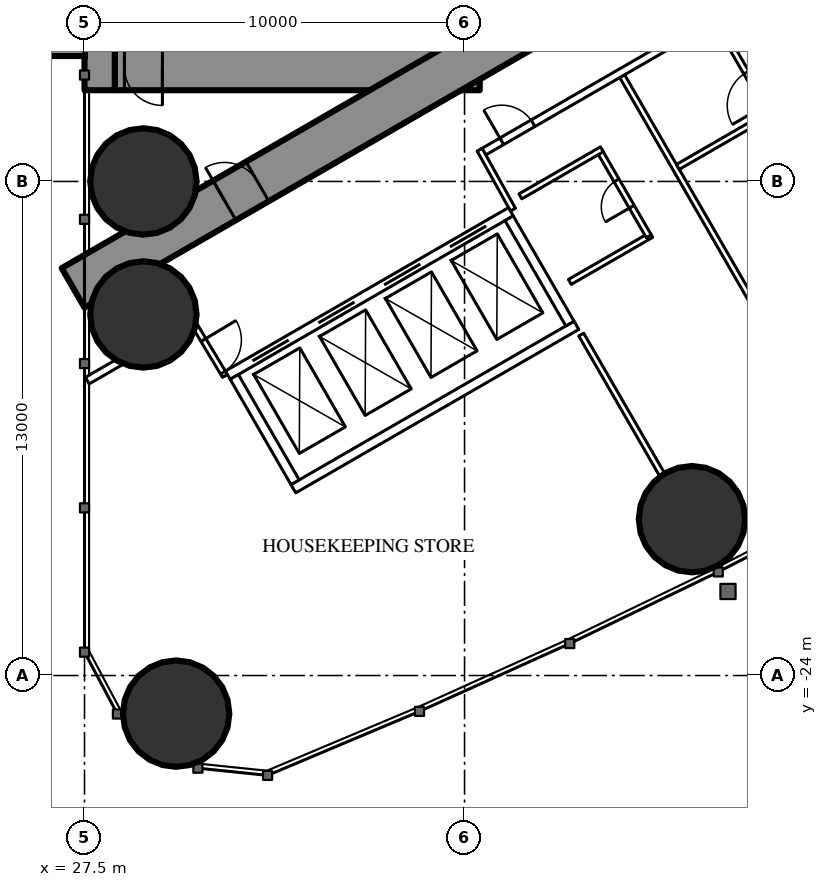
"""IFC4 building model, lengths in metres.
Left out: names, types, materials, properties, quantities, classifications, styles, units other than length and angle.
Written with IfcOpenShell. Run it as: python <this file> out.ifc"""

import sys

from ifc_helpers import new_model, si_unit, direction, frame, frame_2d, origin, origin_2d, place, context, subcontext, project, spatial, rectangle, hollow_circle, extrude, element, fill, save


model = new_model("IFC4")
c1 = context("Model", 3, precision=1e-05, world=origin(), true_north=direction((0.0, 1.0)))
c2 = subcontext(c1, "Body", "Model", "MODEL_VIEW")
j1 = project(units=[si_unit("LENGTHUNIT", "METRE"), si_unit("PLANEANGLEUNIT", "RADIAN")], contexts=[c1])
p1 = place(None, origin())
s1 = spatial("IfcSite", under=j1, at=p1, CompositionType="ELEMENT")
p2 = place(p1, origin())
s2 = spatial("IfcBuilding", under=s1, at=p2, CompositionType="ELEMENT")
p3 = place(p2, frame((0.0, 0.0, 39.0)))
s3 = spatial("IfcBuildingStorey", under=s2, at=p3, CompositionType="ELEMENT", Elevation=39.0)
for number, where, z_axis, x_axis in (
    (1, (29.911, -25.002, 0.0), (0.0, 0.0, 1.0), (1.0, 0.0, 0.0)),
    (2, (29.05, -11.0, 0.0), (0.0, 0.0, 1.0), (1.0, 0.0, 0.0)),
    (3, (29.05, -14.5, 0.0), (0.0, 0.0, 1.0), (1.0, 0.0, 0.0)),
    (4, (43.484, -19.886, 0.0), (0.0, 0.0, 1.0), (1.0, 0.0, 0.0)),
):
    element("IfcColumn", number, at=place(p3, frame(where, z_axis=z_axis, x_axis=x_axis)), inside=s3, PredefinedType="COLUMN", context=c2, shape_type="SweptSolid", body=[
        extrude(hollow_circle(Radius=1.4, WallThickness=0.12, at=origin_2d()), origin(), (0.0, 0.0, 1.0), 3.5),
    ])
p4 = place(p3, frame((27.9, -8.6, 0.0), z_axis=(0.0, 0.0, 1.0), x_axis=(0.0, 1.0, 0.0)))
e5 = element("IfcWall", 5, at=p4, inside=s3, PredefinedType="SHEAR", context=c2, shape_type="SweptSolid", body=[
    extrude(rectangle(XDim=17.2, YDim=0.8, at=frame_2d((8.6, 0.0))), origin(), (0.0, 0.0, 1.0), 3.5),
])
p5 = place(p4, frame((2.45, 0.0, 0.6)))
e6 = element("IfcOpeningElement", 6, at=p5, cuts=e5, PredefinedType="OPENING", context=c2, shape_type="SweptSolid", body=[
    extrude(rectangle(XDim=0.6, YDim=2.1, at=frame_2d((0.3, 1.05))), frame((0.0, 0.41, 0.0), z_axis=(0.0, -1.0, 0.0), x_axis=(1.0, 0.0, 0.0)), (0.0, 0.0, 1.0), 0.82),
])
p6 = place(p4, frame((14.15, 0.0, 0.6)))
e7 = element("IfcOpeningElement", 7, at=p6, cuts=e5, PredefinedType="OPENING", context=c2, shape_type="SweptSolid", body=[
    extrude(rectangle(XDim=0.6, YDim=2.1, at=frame_2d((0.3, 1.05))), frame((0.0, 0.41, 0.0), z_axis=(0.0, -1.0, 0.0), x_axis=(1.0, 0.0, 0.0)), (0.0, 0.0, 1.0), 0.82),
])
p7 = place(p3, frame((37.3, -8.6, 0.0), z_axis=(0.0, 0.0, 1.0), x_axis=(0.0, 1.0, 0.0)))
e8 = element("IfcWall", 8, at=p7, inside=s3, PredefinedType="SHEAR", context=c2, shape_type="SweptSolid", body=[
    extrude(rectangle(XDim=17.2, YDim=1.2, at=frame_2d((8.6, 0.0))), origin(), (0.0, 0.0, 1.0), 3.5),
])
p8 = place(p7, frame((7.7, 0.0, 0.0)))
e9 = element("IfcOpeningElement", 9, at=p8, cuts=e8, PredefinedType="OPENING", context=c2, shape_type="SweptSolid", body=[
    extrude(rectangle(XDim=1.8, YDim=2.2, at=frame_2d((0.9, 1.1))), frame((0.0, 0.61, 0.0), z_axis=(0.0, -1.0, 0.0), x_axis=(1.0, 0.0, 0.0)), (0.0, 0.0, 1.0), 1.22),
])
p9 = place(p3, frame((28.3, -8.0, 0.0), z_axis=(0.0, 0.0, 1.0), x_axis=(1.0, 0.0, 0.0)))
e10 = element("IfcWall", 10, at=p9, inside=s3, PredefinedType="SHEAR", context=c2, shape_type="SweptSolid", body=[
    extrude(rectangle(XDim=8.4, YDim=1.2, at=frame_2d((4.2, 0.0))), origin(), (0.0, 0.0, 1.0), 3.5),
])
p10 = place(p9, frame((0.25, 0.0, 0.0)))
e11 = element("IfcOpeningElement", 11, at=p10, cuts=e10, PredefinedType="OPENING", context=c2, shape_type="SweptSolid", body=[
    extrude(rectangle(XDim=1.0, YDim=2.2, at=frame_2d((0.5, 1.1))), frame((0.0, 0.61, 0.0), z_axis=(0.0, -1.0, 0.0), x_axis=(1.0, 0.0, 0.0)), (0.0, 0.0, 1.0), 1.22),
])
p11 = place(p3, frame((27.2, -13.8, 0.0), z_axis=(0.0, 0.0, 1.0), x_axis=(0.866027159892, 0.499996958321, 0.0)))
e12 = element("IfcWall", 12, at=p11, inside=s3, PredefinedType="SHEAR", context=c2, shape_type="SweptSolid", body=[
    extrude(rectangle(XDim=27.947, YDim=1.2, at=frame_2d((13.973, 0.0))), origin(), (0.0, 0.0, 1.0), 3.5),
])
p12 = place(p11, frame((4.6, 0.0, 0.0)))
e13 = element("IfcOpeningElement", 13, at=p12, cuts=e12, PredefinedType="OPENING", context=c2, shape_type="SweptSolid", body=[
    extrude(rectangle(XDim=1.0, YDim=2.2, at=frame_2d((0.5, 1.1))), frame((0.0, 0.61, 0.0), z_axis=(0.0, -1.0, 0.0), x_axis=(1.0, 0.0, 0.0)), (0.0, 0.0, 1.0), 1.22),
])
p13 = place(p11, frame((13.395, 0.0, 0.0)))
e14 = element("IfcOpeningElement", 14, at=p13, cuts=e12, PredefinedType="OPENING", context=c2, shape_type="SweptSolid", body=[
    extrude(rectangle(XDim=1.8, YDim=2.2, at=frame_2d((0.9, 1.1))), frame((0.0, 0.61, 0.0), z_axis=(0.0, -1.0, 0.0), x_axis=(1.0, 0.0, 0.0)), (0.0, 0.0, 1.0), 1.22),
])
p14 = place(p3, frame((41.647, -8.23, 0.0), z_axis=(0.0, 0.0, 1.0), x_axis=(0.49998590462, -0.866033541603, 0.0)))
e15 = element("IfcWall", 15, at=p14, inside=s3, PredefinedType="PARTITIONING", context=c2, shape_type="SweptSolid", body=[
    extrude(rectangle(XDim=12.621, YDim=0.15, at=frame_2d((6.311, 0.0))), origin(), (0.0, 0.0, 1.0), 3.25),
])
p15 = place(p3, frame((40.57, -15.03, 0.0), z_axis=(0.0, 0.0, 1.0), x_axis=(0.500012993597, -0.866017901798, 0.0)))
e16 = element("IfcWall", 16, at=p15, inside=s3, PredefinedType="PARTITIONING", context=c2, shape_type="SweptSolid", body=[
    extrude(rectangle(XDim=4.243, YDim=0.15, at=frame_2d((2.122, 0.0))), origin(), (0.0, 0.0, 1.0), 3.25),
])
p16 = place(p3, frame((27.572, -16.241, 0.0), z_axis=(0.0, 0.0, 1.0), x_axis=(0.866029654818, 0.499992636921, 0.0)))
e17 = element("IfcWall", 17, at=p16, inside=s3, PredefinedType="PARTITIONING", context=c2, shape_type="SweptSolid", body=[
    extrude(rectangle(XDim=3.155, YDim=0.2, at=frame_2d((1.577, 0.0))), origin(), (0.0, 0.0, 1.0), 3.25),
])
p17 = place(p3, frame((37.96, -10.243, 0.0), z_axis=(0.0, 0.0, 1.0), x_axis=(0.866026429433, 0.499998223521, 0.0)))
e18 = element("IfcWall", 18, at=p17, inside=s3, PredefinedType="PARTITIONING", context=c2, shape_type="SweptSolid", body=[
    extrude(rectangle(XDim=20.487, YDim=0.2, at=frame_2d((10.243, 0.0))), origin(), (0.0, 0.0, 1.0), 3.25),
])
p18 = place(p17, frame((7.325, 0.0, 0.0)))
e19 = element("IfcOpeningElement", 19, at=p18, cuts=e18, PredefinedType="OPENING", context=c2, shape_type="SweptSolid", body=[
    extrude(rectangle(XDim=1.0, YDim=2.2, at=frame_2d((0.5, 1.1))), frame((0.0, 0.11, 0.0), z_axis=(0.0, -1.0, 0.0), x_axis=(1.0, 0.0, 0.0)), (0.0, 0.0, 1.0), 0.22),
])
p19 = place(p17, frame((18.937, 0.0, 0.0)))
e20 = element("IfcOpeningElement", 20, at=p19, cuts=e18, PredefinedType="OPENING", context=c2, shape_type="SweptSolid", body=[
    extrude(rectangle(XDim=0.95, YDim=2.2, at=frame_2d((0.475, 1.1))), frame((0.0, 0.11, 0.0), z_axis=(0.0, -1.0, 0.0), x_axis=(1.0, 0.0, 0.0)), (0.0, 0.0, 1.0), 0.22),
])
p20 = place(p17, frame((0.6, 0.0, 0.0)))
e21 = element("IfcOpeningElement", 21, at=p20, cuts=e18, PredefinedType="OPENING", context=c2, shape_type="SweptSolid", body=[
    extrude(rectangle(XDim=0.95, YDim=2.2, at=frame_2d((0.475, 1.1))), frame((0.0, 0.11, 0.0), z_axis=(0.0, -1.0, 0.0), x_axis=(1.0, 0.0, 0.0)), (0.0, 0.0, 1.0), 0.22),
])
p21 = place(p3, frame((38.773, -11.742, 0.0), z_axis=(0.0, 0.0, 1.0), x_axis=(-0.485528096672, 0.8742210632, 0.0)))
e22 = element("IfcWall", 22, at=p21, inside=s3, PredefinedType="PARTITIONING", context=c2, shape_type="SweptSolid", body=[
    extrude(rectangle(XDim=1.805, YDim=0.15, at=frame_2d((0.903, 0.0))), origin(), (0.0, 0.0, 1.0), 3.25),
])
p22 = place(p3, frame((30.267, -14.569, 0.0), z_axis=(0.0, 0.0, 1.0), x_axis=(0.514336634837, -0.857588377991, 0.0)))
e23 = element("IfcWall", 23, at=p22, inside=s3, PredefinedType="PARTITIONING", context=c2, shape_type="SweptSolid", body=[
    extrude(rectangle(XDim=1.805, YDim=0.15, at=frame_2d((0.903, 0.0))), origin(), (0.0, 0.0, 1.0), 3.25),
])
p23 = place(p22, frame((0.703, 0.0, 0.0)))
e24 = element("IfcOpeningElement", 24, at=p23, cuts=e23, PredefinedType="OPENING", context=c2, shape_type="SweptSolid", body=[
    extrude(rectangle(XDim=1.0, YDim=2.2, at=frame_2d((0.5, 1.1))), frame((0.0, 0.085, 0.0), z_axis=(0.0, -1.0, 0.0), x_axis=(1.0, 0.0, 0.0)), (0.0, 0.0, 1.0), 0.17),
])
p24 = place(p3, frame((43.112, -10.617, 0.0), z_axis=(0.0, 0.0, 1.0), x_axis=(0.866018712932, 0.500011588718, 0.0)))
e25 = element("IfcWall", 25, at=p24, inside=s3, PredefinedType="PARTITIONING", context=c2, shape_type="SweptSolid", body=[
    extrude(rectangle(XDim=2.875, YDim=0.15, at=frame_2d((1.438, 0.0))), origin(), (0.0, 0.0, 1.0), 3.25),
])
p25 = place(p3, frame((44.137, -6.792, 0.0), z_axis=(0.0, 0.0, 1.0), x_axis=(0.49994636267, -0.866056369097, 0.0)))
e26 = element("IfcWall", 26, at=p25, inside=s3, PredefinedType="PARTITIONING", context=c2, shape_type="SweptSolid", body=[
    extrude(rectangle(XDim=2.8, YDim=0.15, at=frame_2d((1.4, 0.0))), origin(), (0.0, 0.0, 1.0), 3.25),
])
p26 = place(p25, frame((1.55, 0.0, 0.0)))
e27 = element("IfcOpeningElement", 27, at=p26, cuts=e26, PredefinedType="OPENING", context=c2, shape_type="SweptSolid", body=[
    extrude(rectangle(XDim=1.0, YDim=2.2, at=frame_2d((0.5, 1.1))), frame((0.0, 0.085, 0.0), z_axis=(0.0, -1.0, 0.0), x_axis=(1.0, 0.0, 0.0)), (0.0, 0.0, 1.0), 0.17),
])
p27 = place(p3, frame((40.27, -13.644, 0.0), z_axis=(0.0, 0.0, 1.0), x_axis=(0.866031185235, 0.4999899861, 0.0)))
e28 = element("IfcWall", 28, at=p27, inside=s3, PredefinedType="PARTITIONING", context=c2, shape_type="SweptSolid", body=[
    extrude(rectangle(XDim=2.475, YDim=0.15, at=frame_2d((1.238, 0.0))), origin(), (0.0, 0.0, 1.0), 3.25),
])
p28 = place(p3, frame((41.048, -10.193, 0.0), z_axis=(0.0, 0.0, 1.0), x_axis=(0.500047596559, -0.865997922154, 0.0)))
e29 = element("IfcWall", 29, at=p28, inside=s3, PredefinedType="PARTITIONING", context=c2, shape_type="SweptSolid", body=[
    extrude(rectangle(XDim=2.6, YDim=0.15, at=frame_2d((1.3, 0.0))), origin(), (0.0, 0.0, 1.0), 3.25),
])
p29 = place(p28, frame((0.9, 0.0, 0.0)))
e30 = element("IfcOpeningElement", 30, at=p29, cuts=e29, PredefinedType="OPENING", context=c2, shape_type="SweptSolid", body=[
    extrude(rectangle(XDim=0.8, YDim=2.2, at=frame_2d((0.4, 1.1))), frame((0.0, 0.085, 0.0), z_axis=(0.0, -1.0, 0.0), x_axis=(1.0, 0.0, 0.0)), (0.0, 0.0, 1.0), 0.17),
])
p30 = place(p3, frame((38.97, -11.393, 0.0), z_axis=(0.0, 0.0, 1.0), x_axis=(0.866031185235, 0.4999899861, 0.0)))
e31 = element("IfcWall", 31, at=p30, inside=s3, PredefinedType="PARTITIONING", context=c2, shape_type="SweptSolid", body=[
    extrude(rectangle(XDim=2.475, YDim=0.15, at=frame_2d((1.238, 0.0))), origin(), (0.0, 0.0, 1.0), 3.25),
])
p31 = place(p3, frame((31.271, -16.097, 0.0), z_axis=(0.0, 0.0, 1.0), x_axis=(0.86604045752, 0.499973925258, 0.0)))
e32 = element("IfcWall", 32, at=p31, inside=s3, PredefinedType="PARTITIONING", context=c2, shape_type="SweptSolid", body=[
    extrude(rectangle(XDim=8.6, YDim=0.25, at=frame_2d((4.3, 0.0))), origin(), (0.0, 0.0, 1.0), 3.25),
])
p32 = place(p31, frame((0.75, 0.0, 0.0)))
e33 = element("IfcOpeningElement", 33, at=p32, cuts=e32, PredefinedType="OPENING", context=c2, shape_type="SweptSolid", body=[
    extrude(rectangle(XDim=1.1, YDim=2.2, at=frame_2d((0.55, 1.1))), frame((0.0, 0.135, 0.0), z_axis=(0.0, -1.0, 0.0), x_axis=(1.0, 0.0, 0.0)), (0.0, 0.0, 1.0), 0.27),
])
p33 = place(p31, frame((2.75, 0.0, 0.0)))
e34 = element("IfcOpeningElement", 34, at=p33, cuts=e32, PredefinedType="OPENING", context=c2, shape_type="SweptSolid", body=[
    extrude(rectangle(XDim=1.1, YDim=2.2, at=frame_2d((0.55, 1.1))), frame((0.0, 0.135, 0.0), z_axis=(0.0, -1.0, 0.0), x_axis=(1.0, 0.0, 0.0)), (0.0, 0.0, 1.0), 0.27),
])
p34 = place(p31, frame((4.75, 0.0, 0.0)))
e35 = element("IfcOpeningElement", 35, at=p34, cuts=e32, PredefinedType="OPENING", context=c2, shape_type="SweptSolid", body=[
    extrude(rectangle(XDim=1.1, YDim=2.2, at=frame_2d((0.55, 1.1))), frame((0.0, 0.135, 0.0), z_axis=(0.0, -1.0, 0.0), x_axis=(1.0, 0.0, 0.0)), (0.0, 0.0, 1.0), 0.27),
])
p35 = place(p31, frame((6.75, 0.0, 0.0)))
e36 = element("IfcOpeningElement", 36, at=p35, cuts=e32, PredefinedType="OPENING", context=c2, shape_type="SweptSolid", body=[
    extrude(rectangle(XDim=1.1, YDim=2.2, at=frame_2d((0.55, 1.1))), frame((0.0, 0.135, 0.0), z_axis=(0.0, -1.0, 0.0), x_axis=(1.0, 0.0, 0.0)), (0.0, 0.0, 1.0), 0.27),
])
p36 = place(p3, frame((32.996, -19.086, 0.0), z_axis=(0.0, 0.0, 1.0), x_axis=(0.866028165386, 0.499995216735, 0.0)))
e37 = element("IfcWall", 37, at=p36, inside=s3, PredefinedType="PARTITIONING", context=c2, shape_type="SweptSolid", body=[
    extrude(rectangle(XDim=8.6, YDim=0.25, at=frame_2d((4.3, 0.0))), origin(), (0.0, 0.0, 1.0), 3.25),
])
for number, where, z_axis, x_axis in (
    (38, (31.441, -16.143, 0.0), (0.0, 0.0, 1.0), (0.5, -0.866, 0.0)),
    (39, (38.673, -11.968, 0.0), (0.0, 0.0, 1.0), (0.5, -0.866, 0.0)),
):
    element("IfcWall", number, at=place(p3, frame(where, z_axis=z_axis, x_axis=x_axis)), inside=s3, PredefinedType="PARTITIONING", context=c2, shape_type="SweptSolid", body=[
        extrude(rectangle(XDim=3.201, YDim=0.25, at=frame_2d((1.6, 0.0))), origin(), (0.0, 0.0, 1.0), 3.25),
    ])
p37 = place(p26, origin())
e40 = element("IfcDoor", 40, at=p37, inside=s3, OperationType="SINGLE_SWING_RIGHT", PredefinedType="DOOR", context=c2, shape_type="SweptSolid", body=[
    extrude(rectangle(XDim=1.0, YDim=2.2, at=frame_2d((0.5, 1.1))), frame((0.0, 0.025, 0.0), z_axis=(0.0, -1.0, 0.0), x_axis=(1.0, 0.0, 0.0)), (0.0, 0.0, 1.0), 0.05),
])
fill(e27, e40)
p38 = place(p29, origin())
e41 = element("IfcDoor", 41, at=p38, inside=s3, OperationType="SINGLE_SWING_RIGHT", PredefinedType="DOOR", context=c2, shape_type="SweptSolid", body=[
    extrude(rectangle(XDim=0.8, YDim=2.2, at=frame_2d((0.4, 1.1))), frame((0.0, 0.025, 0.0), z_axis=(0.0, -1.0, 0.0), x_axis=(1.0, 0.0, 0.0)), (0.0, 0.0, 1.0), 0.05),
])
fill(e30, e41)
p39 = place(p20, origin())
e42 = element("IfcDoor", 42, at=p39, inside=s3, OperationType="SINGLE_SWING_LEFT", PredefinedType="DOOR", context=c2, shape_type="SweptSolid", body=[
    extrude(rectangle(XDim=0.95, YDim=2.2, at=frame_2d((0.475, 1.1))), frame((0.0, 0.025, 0.0), z_axis=(0.0, -1.0, 0.0), x_axis=(1.0, 0.0, 0.0)), (0.0, 0.0, 1.0), 0.05),
])
fill(e21, e42)
p40 = place(p23, origin())
e43 = element("IfcDoor", 43, at=p40, inside=s3, OperationType="SINGLE_SWING_LEFT", PredefinedType="DOOR", context=c2, shape_type="SweptSolid", body=[
    extrude(rectangle(XDim=1.0, YDim=2.2, at=frame_2d((0.5, 1.1))), frame((0.0, 0.025, 0.0), z_axis=(0.0, -1.0, 0.0), x_axis=(1.0, 0.0, 0.0)), (0.0, 0.0, 1.0), 0.05),
])
fill(e24, e43)
p41 = place(p12, origin())
e44 = element("IfcDoor", 44, at=p41, inside=s3, OperationType="SINGLE_SWING_LEFT", PredefinedType="DOOR", context=c2, shape_type="SweptSolid", body=[
    extrude(rectangle(XDim=1.0, YDim=2.2, at=frame_2d((0.5, 1.1))), frame((0.0, 0.025, 0.0), z_axis=(0.0, -1.0, 0.0), x_axis=(1.0, 0.0, 0.0)), (0.0, 0.0, 1.0), 0.05),
])
fill(e13, e44)
p42 = place(p10, origin())
e45 = element("IfcDoor", 45, at=p42, inside=s3, OperationType="SINGLE_SWING_RIGHT", PredefinedType="DOOR", context=c2, shape_type="SweptSolid", body=[
    extrude(rectangle(XDim=1.0, YDim=2.2, at=frame_2d((0.5, 1.1))), frame((0.0, 0.025, 0.0), z_axis=(0.0, -1.0, 0.0), x_axis=(1.0, 0.0, 0.0)), (0.0, 0.0, 1.0), 0.05),
])
fill(e11, e45)
p43 = place(p32, origin())
e46 = element("IfcDoor", 46, at=p43, inside=s3, OperationType="DOUBLE_DOOR_SLIDING", PredefinedType="USERDEFINED", context=c2, shape_type="SweptSolid", body=[
    extrude(rectangle(XDim=1.1, YDim=2.2, at=frame_2d((0.55, 1.1))), frame((0.0, 0.025, 0.0), z_axis=(0.0, -1.0, 0.0), x_axis=(1.0, 0.0, 0.0)), (0.0, 0.0, 1.0), 0.05),
])
fill(e33, e46)
p44 = place(p33, origin())
e47 = element("IfcDoor", 47, at=p44, inside=s3, OperationType="DOUBLE_DOOR_SLIDING", PredefinedType="USERDEFINED", context=c2, shape_type="SweptSolid", body=[
    extrude(rectangle(XDim=1.1, YDim=2.2, at=frame_2d((0.55, 1.1))), frame((0.0, 0.025, 0.0), z_axis=(0.0, -1.0, 0.0), x_axis=(1.0, 0.0, 0.0)), (0.0, 0.0, 1.0), 0.05),
])
fill(e34, e47)
p45 = place(p34, origin())
e48 = element("IfcDoor", 48, at=p45, inside=s3, OperationType="DOUBLE_DOOR_SLIDING", PredefinedType="USERDEFINED", context=c2, shape_type="SweptSolid", body=[
    extrude(rectangle(XDim=1.1, YDim=2.2, at=frame_2d((0.55, 1.1))), frame((0.0, 0.025, 0.0), z_axis=(0.0, -1.0, 0.0), x_axis=(1.0, 0.0, 0.0)), (0.0, 0.0, 1.0), 0.05),
])
fill(e35, e48)
p46 = place(p35, origin())
e49 = element("IfcDoor", 49, at=p46, inside=s3, OperationType="DOUBLE_DOOR_SLIDING", PredefinedType="USERDEFINED", context=c2, shape_type="SweptSolid", body=[
    extrude(rectangle(XDim=1.1, YDim=2.2, at=frame_2d((0.55, 1.1))), frame((0.0, 0.025, 0.0), z_axis=(0.0, -1.0, 0.0), x_axis=(1.0, 0.0, 0.0)), (0.0, 0.0, 1.0), 0.05),
])
fill(e36, e49)
save(model, sys.argv[1])
